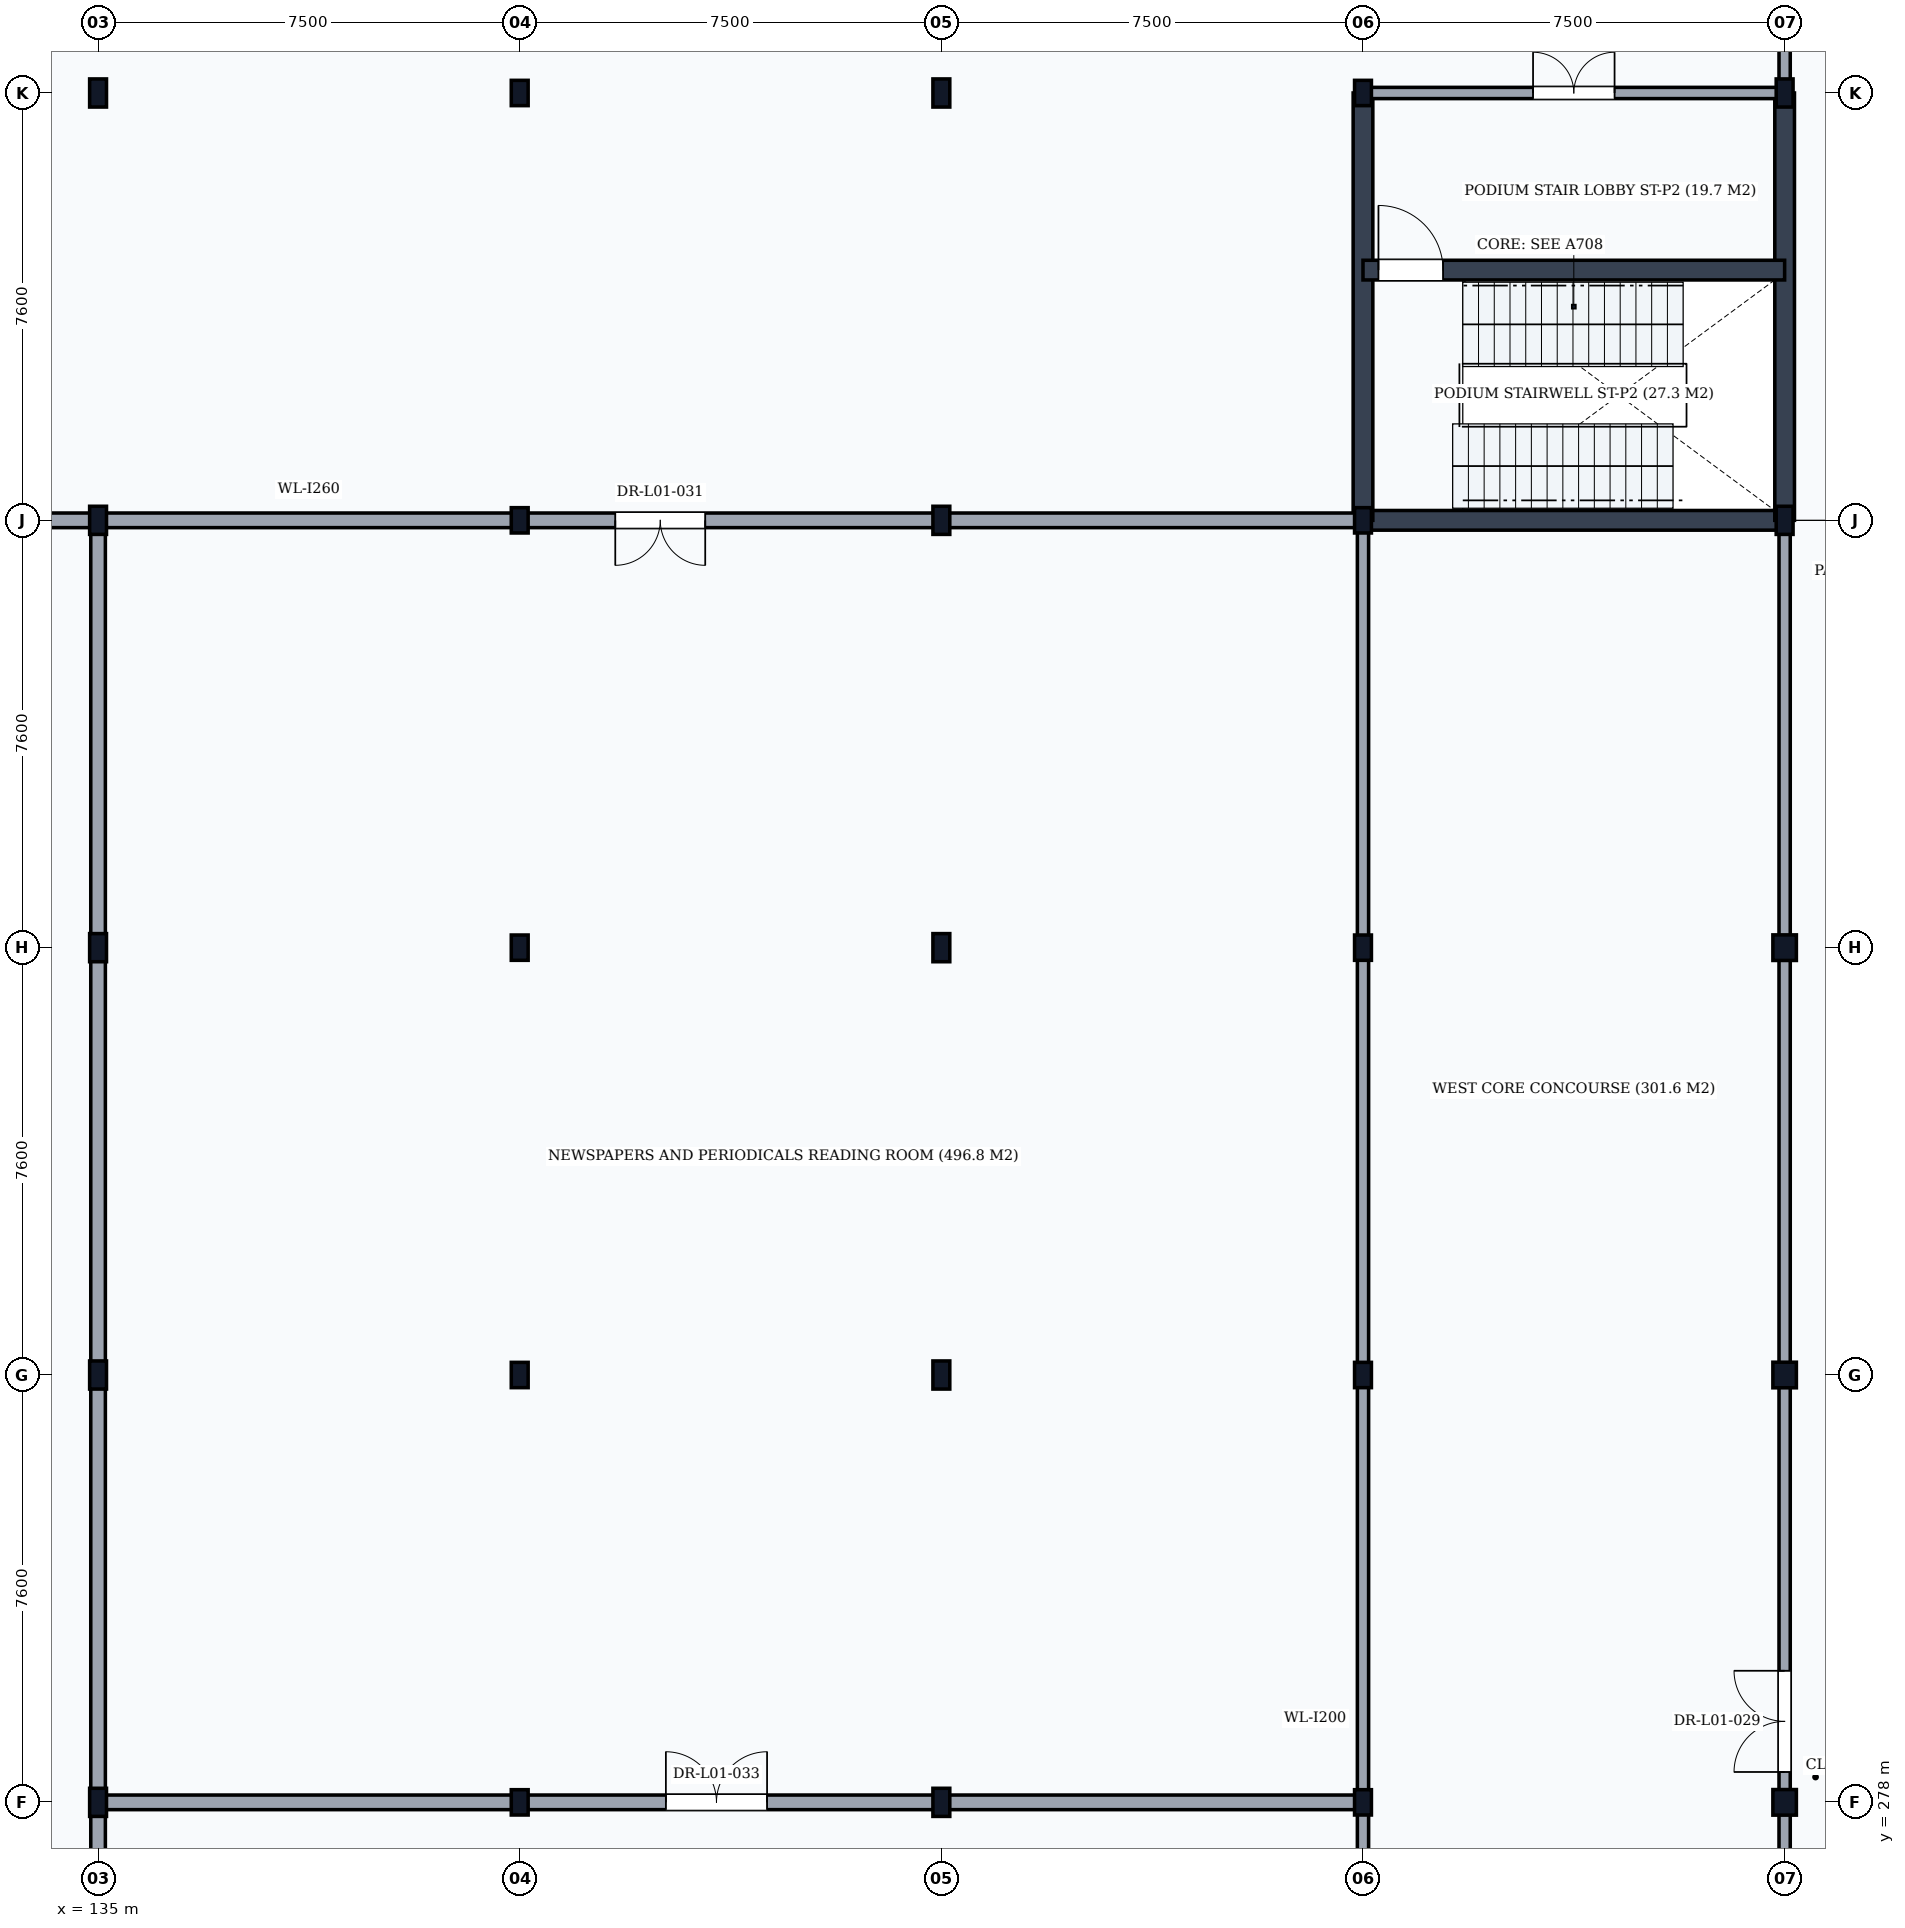
"""IFC4 building model, lengths in metres.
Left out: names, types, materials, properties, quantities, classifications, styles, units other than length and angle.
Written with IfcOpenShell. Run it as: python <this file> out.ifc"""

import sys

from ifc_helpers import new_model, si_unit, direction, frame, frame_2d, origin, origin_2d, place, context, subcontext, project, spatial, rectangle, i_section, extrude, element, fill, save


model = new_model("IFC4")
c1 = context("Model", 3, precision=1e-05, world=origin(), true_north=direction((0.0, 1.0)))
c2 = subcontext(c1, "Body", "Model", "MODEL_VIEW")
j1 = project(units=[si_unit("LENGTHUNIT", "METRE"), si_unit("PLANEANGLEUNIT", "RADIAN")], contexts=[c1])
p1 = place(None, origin())
s1 = spatial("IfcSite", under=j1, at=p1, CompositionType="ELEMENT")
p2 = place(p1, origin())
s2 = spatial("IfcBuilding", under=s1, at=p2, CompositionType="ELEMENT")
p3 = place(p2, origin())
s3 = spatial("IfcBuildingStorey", under=s2, at=p3, CompositionType="ELEMENT", Elevation=0.0)
for number, where, z_axis, x_axis in (
    (1, (135.0, 278.0, 0.0), (0.0, 0.0, 1.0), (1.0, 0.0, 0.0)),
    (2, (135.0, 285.6, 0.0), (0.0, 0.0, 1.0), (1.0, 0.0, 0.0)),
    (3, (135.0, 293.2, 0.0), (0.0, 0.0, 1.0), (1.0, 0.0, 0.0)),
    (4, (135.0, 300.8, 0.0), (0.0, 0.0, 1.0), (1.0, 0.0, 0.0)),
    (5, (135.0, 308.4, 0.0), (0.0, 0.0, 1.0), (1.0, 0.0, 0.0)),
):
    element("IfcColumn", number, at=place(p3, frame(where, z_axis=z_axis, x_axis=x_axis)), inside=s3, PredefinedType="COLUMN", context=c2, shape_type="SweptSolid", body=[
        extrude(i_section(OverallWidth=0.3, OverallDepth=0.5, WebThickness=0.014, FlangeThickness=0.028, FilletRadius=0.027, at=origin_2d()), origin(), (0.0, 0.0, 1.0), 5.4),
    ])
for number, where, z_axis, x_axis in (
    (6, (142.5, 278.0, 0.0), (0.0, 0.0, 1.0), (1.0, 0.0, 0.0)),
    (7, (142.5, 285.6, 0.0), (0.0, 0.0, 1.0), (1.0, 0.0, 0.0)),
    (8, (142.5, 293.2, 0.0), (0.0, 0.0, 1.0), (1.0, 0.0, 0.0)),
    (9, (142.5, 300.8, 0.0), (0.0, 0.0, 1.0), (1.0, 0.0, 0.0)),
    (10, (142.5, 308.4, 0.0), (0.0, 0.0, 1.0), (1.0, 0.0, 0.0)),
):
    element("IfcColumn", number, at=place(p3, frame(where, z_axis=z_axis, x_axis=x_axis)), inside=s3, PredefinedType="COLUMN", context=c2, shape_type="SweptSolid", body=[
        extrude(i_section(OverallWidth=0.3, OverallDepth=0.45, WebThickness=0.014, FlangeThickness=0.026, FilletRadius=0.027, at=origin_2d()), origin(), (0.0, 0.0, 1.0), 5.4),
    ])
for number, where, z_axis, x_axis in (
    (11, (150.0, 278.0, 0.0), (0.0, 0.0, 1.0), (1.0, 0.0, 0.0)),
    (12, (150.0, 285.6, 0.0), (0.0, 0.0, 1.0), (1.0, 0.0, 0.0)),
    (13, (150.0, 293.2, 0.0), (0.0, 0.0, 1.0), (1.0, 0.0, 0.0)),
    (14, (150.0, 300.8, 0.0), (0.0, 0.0, 1.0), (1.0, 0.0, 0.0)),
    (15, (150.0, 308.4, 0.0), (0.0, 0.0, 1.0), (1.0, 0.0, 0.0)),
):
    element("IfcColumn", number, at=place(p3, frame(where, z_axis=z_axis, x_axis=x_axis)), inside=s3, PredefinedType="COLUMN", context=c2, shape_type="SweptSolid", body=[
        extrude(i_section(OverallWidth=0.3, OverallDepth=0.5, WebThickness=0.014, FlangeThickness=0.028, FilletRadius=0.027, at=origin_2d()), origin(), (0.0, 0.0, 1.0), 5.4),
    ])
for number, where, z_axis, x_axis in (
    (16, (157.5, 278.0, 0.0), (0.0, 0.0, 1.0), (1.0, 0.0, 0.0)),
    (17, (157.5, 285.6, 0.0), (0.0, 0.0, 1.0), (1.0, 0.0, 0.0)),
    (18, (157.5, 293.2, 0.0), (0.0, 0.0, 1.0), (1.0, 0.0, 0.0)),
    (19, (157.5, 300.8, 0.0), (0.0, 0.0, 1.0), (1.0, 0.0, 0.0)),
    (20, (157.5, 308.4, 0.0), (0.0, 0.0, 1.0), (1.0, 0.0, 0.0)),
):
    element("IfcColumn", number, at=place(p3, frame(where, z_axis=z_axis, x_axis=x_axis)), inside=s3, PredefinedType="COLUMN", context=c2, shape_type="SweptSolid", body=[
        extrude(i_section(OverallWidth=0.3, OverallDepth=0.45, WebThickness=0.014, FlangeThickness=0.026, FilletRadius=0.027, at=origin_2d()), origin(), (0.0, 0.0, 1.0), 5.4),
    ])
for number, where, z_axis, x_axis in (
    (21, (165.0, 278.0, 0.0), (0.0, 0.0, 1.0), (1.0, 0.0, 0.0)),
    (22, (165.0, 285.6, 0.0), (0.0, 0.0, 1.0), (1.0, 0.0, 0.0)),
    (23, (165.0, 293.2, 0.0), (0.0, 0.0, 1.0), (1.0, 0.0, 0.0)),
):
    element("IfcColumn", number, at=place(p3, frame(where, z_axis=z_axis, x_axis=x_axis)), inside=s3, PredefinedType="COLUMN", context=c2, shape_type="SweptSolid", body=[
        extrude(i_section(OverallWidth=0.418, OverallDepth=0.455, WebThickness=0.042, FlangeThickness=0.068, FilletRadius=0.015, at=origin_2d()), origin(), (0.0, 0.0, 1.0), 5.4),
    ])
for number, where, z_axis, x_axis in (
    (24, (165.0, 300.8, 0.0), (0.0, 0.0, 1.0), (1.0, 0.0, 0.0)),
    (25, (165.0, 308.4, 0.0), (0.0, 0.0, 1.0), (1.0, 0.0, 0.0)),
):
    element("IfcColumn", number, at=place(p3, frame(where, z_axis=z_axis, x_axis=x_axis)), inside=s3, PredefinedType="COLUMN", context=c2, shape_type="SweptSolid", body=[
        extrude(i_section(OverallWidth=0.3, OverallDepth=0.5, WebThickness=0.014, FlangeThickness=0.028, FilletRadius=0.027, at=origin_2d()), origin(), (0.0, 0.0, 1.0), 5.4),
    ])
p4 = place(p3, frame((157.5, 300.8, 0.0), z_axis=(0.0, 0.0, 1.0), x_axis=(1.0, 0.0, 0.0)))
e26 = element("IfcWall", 26, at=p4, inside=s3, PredefinedType="SHEAR", context=c2, shape_type="SweptSolid", body=[
    extrude(rectangle(XDim=7.5, YDim=0.35, at=frame_2d((3.75, 0.0))), origin(), (0.0, 0.0, 1.0), 5.14),
])
for number, where, z_axis, x_axis in (
    (27, (157.5, 300.8, 0.0), (0.0, 0.0, 1.0), (0.0, 1.0, 0.0)),
    (28, (165.0, 300.8, 0.0), (0.0, 0.0, 1.0), (0.0, 1.0, 0.0)),
):
    element("IfcWall", number, at=place(p3, frame(where, z_axis=z_axis, x_axis=x_axis)), inside=s3, PredefinedType="SHEAR", context=c2, shape_type="SweptSolid", body=[
        extrude(rectangle(XDim=7.6, YDim=0.35, at=frame_2d((3.8, 0.0))), origin(), (0.0, 0.0, 1.0), 5.14),
    ])
p5 = place(p3, frame((157.5, 305.25, 0.0), z_axis=(0.0, 0.0, 1.0), x_axis=(1.0, 0.0, 0.0)))
e29 = element("IfcWall", 29, at=p5, inside=s3, PredefinedType="SHEAR", context=c2, shape_type="SweptSolid", body=[
    extrude(rectangle(XDim=7.5, YDim=0.35, at=frame_2d((3.75, 0.0))), origin(), (0.0, 0.0, 1.0), 5.14),
])
p6 = place(p5, frame((0.275, 0.0, 0.0)))
e30 = element("IfcOpeningElement", 30, at=p6, cuts=e29, PredefinedType="OPENING", context=c2, shape_type="SweptSolid", body=[
    extrude(rectangle(XDim=1.15, YDim=2.15, at=frame_2d((0.575, 1.075))), frame((0.0, 0.19, 0.0), z_axis=(0.0, -1.0, 0.0), x_axis=(1.0, 0.0, 0.0)), (0.0, 0.0, 1.0), 0.38),
])
p7 = place(p3, frame((157.5, 308.4, 0.0), z_axis=(0.0, 0.0, 1.0), x_axis=(1.0, 0.0, 0.0)))
e31 = element("IfcWall", 31, at=p7, inside=s3, PredefinedType="PARTITIONING", context=c2, shape_type="SweptSolid", body=[
    extrude(rectangle(XDim=7.5, YDim=0.2, at=frame_2d((3.75, 0.0))), origin(), (0.0, 0.0, 1.0), 4.778),
])
p8 = place(p7, frame((3.025, 0.0, 0.0)))
e32 = element("IfcOpeningElement", 32, at=p8, cuts=e31, PredefinedType="OPENING", context=c2, shape_type="SweptSolid", body=[
    extrude(rectangle(XDim=1.45, YDim=2.2, at=frame_2d((0.725, 1.1))), frame((0.0, 0.115, 0.0), z_axis=(0.0, -1.0, 0.0), x_axis=(1.0, 0.0, 0.0)), (0.0, 0.0, 1.0), 0.23),
])
p9 = place(p3, frame((157.5, 258.2, 0.0), z_axis=(0.0, 0.0, 1.0), x_axis=(0.0, 1.0, 0.0)))
e33 = element("IfcWall", 33, at=p9, inside=s3, PredefinedType="PARTITIONING", context=c2, shape_type="SweptSolid", body=[
    extrude(rectangle(XDim=42.6, YDim=0.2, at=frame_2d((21.3, 0.0))), origin(), (0.0, 0.0, 1.0), 4.778),
])
p10 = place(p3, frame((165.0, 258.2, 0.0), z_axis=(0.0, 0.0, 1.0), x_axis=(0.0, 1.0, 0.0)))
e34 = element("IfcWall", 34, at=p10, inside=s3, PredefinedType="PARTITIONING", context=c2, shape_type="SweptSolid", body=[
    extrude(rectangle(XDim=42.6, YDim=0.2, at=frame_2d((21.3, 0.0))), origin(), (0.0, 0.0, 1.0), 4.738),
])
p11 = place(p10, frame((20.34, 0.0, 0.0)))
e35 = element("IfcOpeningElement", 35, at=p11, cuts=e34, PredefinedType="OPENING", context=c2, shape_type="SweptSolid", body=[
    extrude(rectangle(XDim=1.8, YDim=2.4, at=frame_2d((0.9, 1.2))), frame((0.0, 0.115, 0.0), z_axis=(0.0, -1.0, 0.0), x_axis=(1.0, 0.0, 0.0)), (0.0, 0.0, 1.0), 0.23),
])
p12 = place(p3, frame((165.0, 308.4, 0.0), z_axis=(0.0, 0.0, 1.0), x_axis=(0.0, 1.0, 0.0)))
e36 = element("IfcWall", 36, at=p12, inside=s3, PredefinedType="PARTITIONING", context=c2, shape_type="SweptSolid", body=[
    extrude(rectangle(XDim=37.2, YDim=0.2, at=frame_2d((18.6, 0.0))), origin(), (0.0, 0.0, 1.0), 4.778),
])
p13 = place(p12, frame((12.86, 0.0, 0.0)))
e37 = element("IfcOpeningElement", 37, at=p13, cuts=e36, PredefinedType="OPENING", context=c2, shape_type="SweptSolid", body=[
    extrude(rectangle(XDim=1.8, YDim=2.4, at=frame_2d((0.9, 1.2))), frame((0.0, 0.115, 0.0), z_axis=(0.0, -1.0, 0.0), x_axis=(1.0, 0.0, 0.0)), (0.0, 0.0, 1.0), 0.23),
])
p14 = place(p3, frame((120.0, 300.8, 0.0), z_axis=(0.0, 0.0, 1.0), x_axis=(1.0, 0.0, 0.0)))
e38 = element("IfcWall", 38, at=p14, inside=s3, PredefinedType="PARTITIONING", context=c2, shape_type="SweptSolid", body=[
    extrude(rectangle(XDim=37.5, YDim=0.26, at=frame_2d((18.75, 0.0))), origin(), (0.0, 0.0, 1.0), 4.788),
])
p15 = place(p14, frame((24.2, 0.0, 0.0)))
e39 = element("IfcOpeningElement", 39, at=p15, cuts=e38, PredefinedType="OPENING", context=c2, shape_type="SweptSolid", body=[
    extrude(rectangle(XDim=1.6, YDim=2.25, at=frame_2d((0.8, 1.125))), frame((0.0, 0.145, 0.0), z_axis=(0.0, -1.0, 0.0), x_axis=(1.0, 0.0, 0.0)), (0.0, 0.0, 1.0), 0.29),
])
p16 = place(p3, frame((135.0, 258.2, 0.0), z_axis=(0.0, 0.0, 1.0), x_axis=(0.0, 1.0, 0.0)))
e40 = element("IfcWall", 40, at=p16, inside=s3, PredefinedType="PARTITIONING", context=c2, shape_type="SweptSolid", body=[
    extrude(rectangle(XDim=42.6, YDim=0.26, at=frame_2d((21.3, 0.0))), origin(), (0.0, 0.0, 1.0), 4.778),
])
p17 = place(p16, frame((9.1, 0.0, 0.0)))
e41 = element("IfcOpeningElement", 41, at=p17, cuts=e40, PredefinedType="OPENING", context=c2, shape_type="SweptSolid", body=[
    extrude(rectangle(XDim=1.8, YDim=2.4, at=frame_2d((0.9, 1.2))), frame((0.0, 0.145, 0.0), z_axis=(0.0, -1.0, 0.0), x_axis=(1.0, 0.0, 0.0)), (0.0, 0.0, 1.0), 0.29),
])
p18 = place(p3, frame((135.0, 278.0, 0.0), z_axis=(0.0, 0.0, 1.0), x_axis=(1.0, 0.0, 0.0)))
e42 = element("IfcWall", 42, at=p18, inside=s3, PredefinedType="PARTITIONING", context=c2, shape_type="SweptSolid", body=[
    extrude(rectangle(XDim=22.5, YDim=0.26, at=frame_2d((11.25, 0.0))), origin(), (0.0, 0.0, 1.0), 4.778),
])
p19 = place(p18, frame((10.1, 0.0, 0.0)))
e43 = element("IfcOpeningElement", 43, at=p19, cuts=e42, PredefinedType="OPENING", context=c2, shape_type="SweptSolid", body=[
    extrude(rectangle(XDim=1.8, YDim=2.4, at=frame_2d((0.9, 1.2))), frame((0.0, 0.145, 0.0), z_axis=(0.0, -1.0, 0.0), x_axis=(1.0, 0.0, 0.0)), (0.0, 0.0, 1.0), 0.29),
])
p20 = place(p6, origin())
e44 = element("IfcDoor", 44, at=p20, inside=s3, OperationType="SINGLE_SWING_LEFT", PredefinedType="DOOR", context=c2, shape_type="SweptSolid", body=[
    extrude(rectangle(XDim=1.15, YDim=2.15, at=frame_2d((0.575, 1.075))), frame((0.0, 0.025, 0.0), z_axis=(0.0, -1.0, 0.0), x_axis=(1.0, 0.0, 0.0)), (0.0, 0.0, 1.0), 0.05),
])
fill(e30, e44)
p21 = place(p8, origin())
e45 = element("IfcDoor", 45, at=p21, inside=s3, OperationType="DOUBLE_DOOR_SINGLE_SWING", PredefinedType="DOOR", context=c2, shape_type="SweptSolid", body=[
    extrude(rectangle(XDim=1.45, YDim=2.2, at=frame_2d((0.725, 1.1))), frame((0.0, 0.025, 0.0), z_axis=(0.0, -1.0, 0.0), x_axis=(1.0, 0.0, 0.0)), (0.0, 0.0, 1.0), 0.05),
])
fill(e32, e45)
p22 = place(p11, origin())
e46 = element("IfcDoor", 46, at=p22, inside=s3, OperationType="DOUBLE_DOOR_SINGLE_SWING", PredefinedType="DOOR", context=c2, shape_type="SweptSolid", body=[
    extrude(rectangle(XDim=1.8, YDim=2.4, at=frame_2d((0.9, 1.2))), frame((0.0, 0.025, 0.0), z_axis=(0.0, -1.0, 0.0), x_axis=(1.0, 0.0, 0.0)), (0.0, 0.0, 1.0), 0.05),
])
fill(e35, e46)
p23 = place(p15, frame((1.6, 0.0, 0.0), z_axis=(0.0, 0.0, 1.0), x_axis=(-1.0, 0.0, 0.0)))
e47 = element("IfcDoor", 47, at=p23, inside=s3, OperationType="DOUBLE_DOOR_SINGLE_SWING", PredefinedType="DOOR", context=c2, shape_type="SweptSolid", body=[
    extrude(rectangle(XDim=1.6, YDim=2.25, at=frame_2d((0.8, 1.125))), frame((0.0, 0.025, 0.0), z_axis=(0.0, -1.0, 0.0), x_axis=(1.0, 0.0, 0.0)), (0.0, 0.0, 1.0), 0.05),
])
fill(e39, e47)
p24 = place(p19, origin())
e48 = element("IfcDoor", 48, at=p24, inside=s3, OperationType="DOUBLE_DOOR_SINGLE_SWING", PredefinedType="DOOR", context=c2, shape_type="SweptSolid", body=[
    extrude(rectangle(XDim=1.8, YDim=2.4, at=frame_2d((0.9, 1.2))), frame((0.0, 0.025, 0.0), z_axis=(0.0, -1.0, 0.0), x_axis=(1.0, 0.0, 0.0)), (0.0, 0.0, 1.0), 0.05),
])
fill(e43, e48)
save(model, sys.argv[1])
